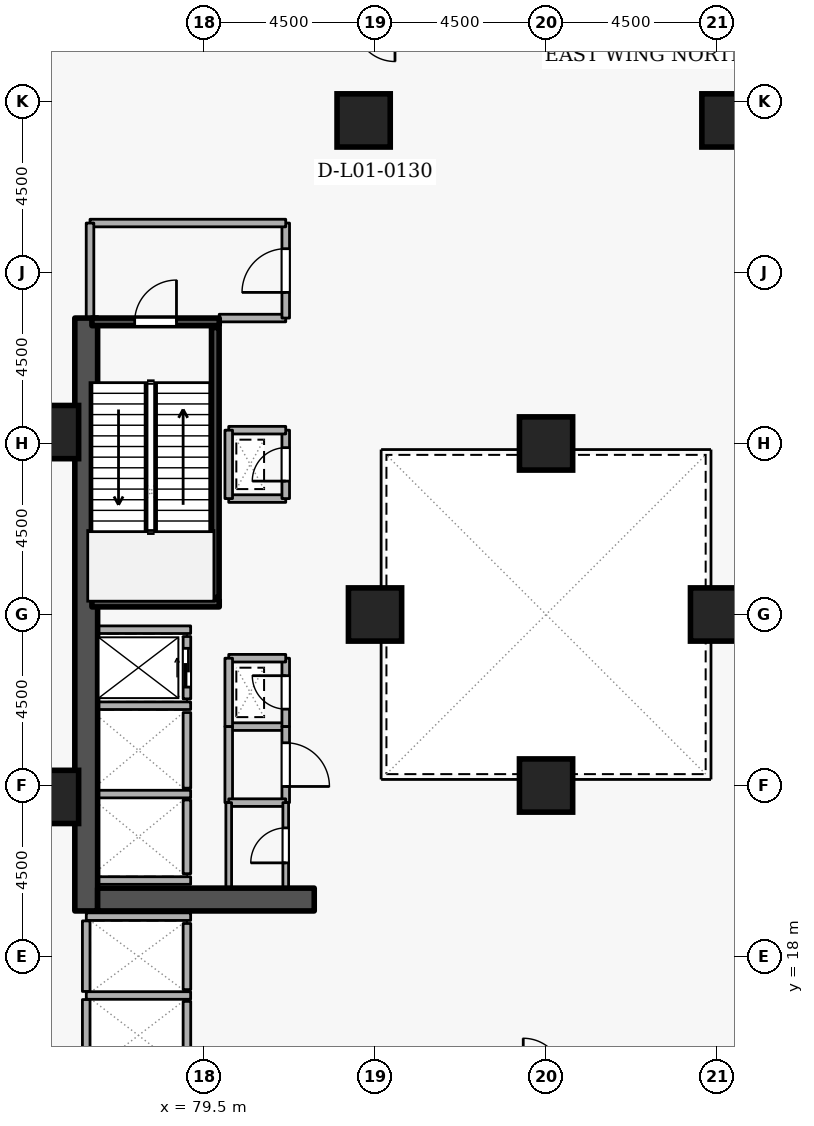
"""IFC4 building model, lengths in metres.
Left out: names, types, materials, properties, quantities, classifications, styles, units other than length and angle.
Written with IfcOpenShell. Run it as: python <this file> out.ifc"""

import sys

from ifc_helpers import new_model, si_unit, direction, frame, frame_2d, origin, origin_2d, place, context, subcontext, project, spatial, rectangle, extrude, element, fill, save


model = new_model("IFC4")
c1 = context("Model", 3, precision=1e-05, world=origin(), true_north=direction((0.0, 1.0)))
c2 = subcontext(c1, "Body", "Model", "MODEL_VIEW")
j1 = project(units=[si_unit("LENGTHUNIT", "METRE"), si_unit("PLANEANGLEUNIT", "RADIAN")], contexts=[c1])
p1 = place(None, origin())
s1 = spatial("IfcSite", under=j1, at=p1, CompositionType="ELEMENT")
p2 = place(p1, origin())
s2 = spatial("IfcBuilding", under=s1, at=p2, CompositionType="ELEMENT")
p3 = place(p2, frame((0.0, 0.0, 4.8)))
s3 = spatial("IfcBuildingStorey", under=s2, at=p3, CompositionType="ELEMENT", Elevation=4.8)
p4 = place(p3, frame((76.4, 19.2, 0.0), z_axis=(0.0, 0.0, 1.0), x_axis=(0.0, 1.0, 0.0)))
e1 = element("IfcWall", 1, at=p4, inside=s3, PredefinedType="SHEAR", context=c2, shape_type="SweptSolid", body=[
    extrude(rectangle(XDim=15.6, YDim=0.6, at=frame_2d((7.8, 0.0))), origin(), (0.0, 0.0, 1.0), 4.8),
])
p5 = place(p3, frame((76.7, 19.5, 0.0), z_axis=(0.0, 0.0, 1.0), x_axis=(1.0, 0.0, 0.0)))
e2 = element("IfcWall", 2, at=p5, inside=s3, PredefinedType="SHEAR", context=c2, shape_type="SweptSolid", body=[
    extrude(rectangle(XDim=5.7, YDim=0.6, at=frame_2d((2.85, 0.0))), origin(), (0.0, 0.0, 1.0), 4.8),
])
for number, where, z_axis, x_axis in (
    (3, (93.3, 40.0, 0.0), (0.0, 0.0, 1.0), (1.0, 0.0, 0.0)),
    (4, (83.7, 40.0, 0.0), (0.0, 0.0, 1.0), (1.0, 0.0, 0.0)),
    (5, (75.5, 22.2, 0.0), (0.0, 0.0, 1.0), (1.0, 0.0, 0.0)),
    (6, (75.5, 31.8, 0.0), (0.0, 0.0, 1.0), (1.0, 0.0, 0.0)),
    (7, (93.0, 27.0, 0.0), (0.0, 0.0, 1.0), (1.0, 0.0, 0.0)),
    (8, (84.0, 27.0, 0.0), (0.0, 0.0, 1.0), (1.0, 0.0, 0.0)),
    (9, (88.5, 22.5, 0.0), (0.0, 0.0, 1.0), (1.0, 0.0, 0.0)),
    (10, (88.5, 31.5, 0.0), (0.0, 0.0, 1.0), (1.0, 0.0, 0.0)),
):
    element("IfcColumn", number, at=place(p3, frame(where, z_axis=z_axis, x_axis=x_axis)), inside=s3, PredefinedType="COLUMN", context=c2, shape_type="SweptSolid", body=[
        extrude(rectangle(XDim=1.4, YDim=1.4, at=origin_2d()), origin(), (0.0, 0.0, 1.0), 4.8),
    ])
p6 = place(p3, frame((79.05, 24.78, 0.0), z_axis=(0.0, 0.0, 1.0), x_axis=(0.0, 1.0, 0.0)))
e11 = element("IfcWall", 11, at=p6, inside=s3, PredefinedType="STANDARD", context=c2, shape_type="SweptSolid", body=[
    extrude(rectangle(XDim=1.64, YDim=0.2, at=frame_2d((0.82, 0.0))), origin(), (0.0, 0.0, 1.0), 4.46),
])
p7 = place(p6, frame((0.31, 0.0, 0.0)))
e12 = element("IfcOpeningElement", 12, at=p7, cuts=e11, PredefinedType="OPENING", context=c2, shape_type="SweptSolid", body=[
    extrude(rectangle(XDim=1.02, YDim=2.06, at=frame_2d((0.51, 1.03))), frame((0.0, 0.11, 0.0), z_axis=(0.0, -1.0, 0.0), x_axis=(1.0, 0.0, 0.0)), (0.0, 0.0, 1.0), 0.22),
])
p8 = place(p3, frame((79.05, 22.43, 0.0), z_axis=(0.0, 0.0, 1.0), x_axis=(0.0, 1.0, 0.0)))
e13 = element("IfcWall", 13, at=p8, inside=s3, PredefinedType="STANDARD", context=c2, shape_type="SweptSolid", body=[
    extrude(rectangle(XDim=1.99, YDim=0.2, at=frame_2d((0.995, 0.0))), origin(), (0.0, 0.0, 1.0), 4.46),
])
p9 = place(p3, frame((79.05, 20.18, 0.0), z_axis=(0.0, 0.0, 1.0), x_axis=(0.0, 1.0, 0.0)))
e14 = element("IfcWall", 14, at=p9, inside=s3, PredefinedType="STANDARD", context=c2, shape_type="SweptSolid", body=[
    extrude(rectangle(XDim=1.94, YDim=0.2, at=frame_2d((0.97, 0.0))), origin(), (0.0, 0.0, 1.0), 4.46),
])
p10 = place(p3, frame((79.05, 17.13, 0.0), z_axis=(0.0, 0.0, 1.0), x_axis=(0.0, 1.0, 0.0)))
e15 = element("IfcWall", 15, at=p10, inside=s3, PredefinedType="STANDARD", context=c2, shape_type="SweptSolid", body=[
    extrude(rectangle(XDim=1.74, YDim=0.2, at=frame_2d((0.87, 0.0))), origin(), (0.0, 0.0, 1.0), 4.46),
])
p11 = place(p3, frame((79.05, 15.03, 0.0), z_axis=(0.0, 0.0, 1.0), x_axis=(0.0, 1.0, 0.0)))
e16 = element("IfcWall", 16, at=p11, inside=s3, PredefinedType="STANDARD", context=c2, shape_type="SweptSolid", body=[
    extrude(rectangle(XDim=1.79, YDim=0.2, at=frame_2d((0.895, 0.0))), origin(), (0.0, 0.0, 1.0), 4.46),
])
for number, where, z_axis, x_axis in (
    (17, (76.712, 26.6, 0.0), (0.0, 0.0, 1.0), (1.0, 0.0, 0.0)),
    (18, (76.712, 24.6, 0.0), (0.0, 0.0, 1.0), (1.0, 0.0, 0.0)),
    (19, (76.712, 22.275, 0.0), (0.0, 0.0, 1.0), (1.0, 0.0, 0.0)),
    (20, (76.712, 20.0, 0.0), (0.0, 0.0, 1.0), (1.0, 0.0, 0.0)),
):
    element("IfcWall", number, at=place(p3, frame(where, z_axis=z_axis, x_axis=x_axis)), inside=s3, PredefinedType="STANDARD", context=c2, shape_type="SweptSolid", body=[
        extrude(rectangle(XDim=2.436, YDim=0.2, at=frame_2d((1.218, 0.0))), origin(), (0.0, 0.0, 1.0), 4.46),
    ])
p12 = place(p3, frame((76.402, 19.05, 0.0), z_axis=(0.0, 0.0, 1.0), x_axis=(1.0, 0.0, 0.0)))
e21 = element("IfcWall", 21, at=p12, inside=s3, PredefinedType="STANDARD", context=c2, shape_type="SweptSolid", body=[
    extrude(rectangle(XDim=2.746, YDim=0.2, at=frame_2d((1.373, 0.0))), origin(), (0.0, 0.0, 1.0), 3.665),
])
p13 = place(p3, frame((76.402, 16.975, 0.0), z_axis=(0.0, 0.0, 1.0), x_axis=(1.0, 0.0, 0.0)))
e22 = element("IfcWall", 22, at=p13, inside=s3, PredefinedType="STANDARD", context=c2, shape_type="SweptSolid", body=[
    extrude(rectangle(XDim=2.746, YDim=0.2, at=frame_2d((1.373, 0.0))), origin(), (0.0, 0.0, 1.0), 4.46),
])
p14 = place(p3, frame((76.4, 14.852, 0.0), z_axis=(0.0, 0.0, 1.0), x_axis=(0.0, 1.0, 0.0)))
e23 = element("IfcWall", 23, at=p14, inside=s3, PredefinedType="STANDARD", context=c2, shape_type="SweptSolid", body=[
    extrude(rectangle(XDim=2.016, YDim=0.2, at=frame_2d((1.008, 0.0))), origin(), (0.0, 0.0, 1.0), 4.46),
])
p15 = place(p3, frame((76.4, 17.082, 0.0), z_axis=(0.0, 0.0, 1.0), x_axis=(0.0, 1.0, 0.0)))
e24 = element("IfcWall", 24, at=p15, inside=s3, PredefinedType="STANDARD", context=c2, shape_type="SweptSolid", body=[
    extrude(rectangle(XDim=1.856, YDim=0.2, at=frame_2d((0.928, 0.0))), origin(), (0.0, 0.0, 1.0), 4.46),
])
p16 = place(p3, frame((76.55, 34.7, 0.0), z_axis=(0.0, 0.0, 1.0), x_axis=(1.0, 0.0, 0.0)))
e25 = element("IfcWall", 25, at=p16, inside=s3, PredefinedType="SHEAR", context=c2, shape_type="SweptSolid", body=[
    extrude(rectangle(XDim=3.35, YDim=0.2, at=frame_2d((1.675, 0.0))), origin(), (0.0, 0.0, 1.0), 4.8),
])
p17 = place(p16, frame((1.125, 0.0, 0.0)))
e26 = element("IfcOpeningElement", 26, at=p17, cuts=e25, PredefinedType="OPENING", context=c2, shape_type="SweptSolid", body=[
    extrude(rectangle(XDim=1.1, YDim=2.1, at=frame_2d((0.55, 1.05))), frame((0.0, 0.11, 0.0), z_axis=(0.0, -1.0, 0.0), x_axis=(1.0, 0.0, 0.0)), (0.0, 0.0, 1.0), 0.22),
])
p18 = place(p3, frame((79.9, 27.3, 0.0), z_axis=(0.0, 0.0, 1.0), x_axis=(-1.0, 0.0, 0.0)))
e27 = element("IfcWall", 27, at=p18, inside=s3, PredefinedType="SHEAR", context=c2, shape_type="SweptSolid", body=[
    extrude(rectangle(XDim=3.35, YDim=0.2, at=frame_2d((1.675, 0.0))), origin(), (0.0, 0.0, 1.0), 4.8),
])
p19 = place(p3, frame((79.797, 27.45, 0.0), z_axis=(0.0, 0.0, 1.0), x_axis=(0.0, 1.0, 0.0)))
e28 = element("IfcWall", 28, at=p19, inside=s3, PredefinedType="SHEAR", context=c2, shape_type="SweptSolid", body=[
    extrude(rectangle(XDim=7.1, YDim=0.2, at=frame_2d((3.55, 0.0))), origin(), (0.0, 0.0, 1.0), 4.8),
])
p20 = place(p3, frame((79.9, 34.8, 0.0), z_axis=(0.0, 0.0, 1.0), x_axis=(1.0, 0.0, 0.0)))
e29 = element("IfcWall", 29, at=p20, inside=s3, PredefinedType="STANDARD", context=c2, shape_type="SweptSolid", body=[
    extrude(rectangle(XDim=1.75, YDim=0.2, at=frame_2d((0.875, 0.0))), origin(), (0.0, 0.0, 1.0), 3.665),
])
p21 = place(p3, frame((81.65, 34.8, 0.0), z_axis=(0.0, 0.0, 1.0), x_axis=(0.0, 1.0, 0.0)))
e30 = element("IfcWall", 30, at=p21, inside=s3, PredefinedType="STANDARD", context=c2, shape_type="SweptSolid", body=[
    extrude(rectangle(XDim=2.5, YDim=0.2, at=frame_2d((1.25, 0.0))), origin(), (0.0, 0.0, 1.0), 4.46),
])
p22 = place(p21, frame((0.675, 0.0, 0.0)))
e31 = element("IfcOpeningElement", 31, at=p22, cuts=e30, PredefinedType="OPENING", context=c2, shape_type="SweptSolid", body=[
    extrude(rectangle(XDim=1.15, YDim=2.1, at=frame_2d((0.575, 1.05))), frame((0.0, 0.11, 0.0), z_axis=(0.0, -1.0, 0.0), x_axis=(1.0, 0.0, 0.0)), (0.0, 0.0, 1.0), 0.22),
])
p23 = place(p3, frame((81.65, 37.3, 0.0), z_axis=(0.0, 0.0, 1.0), x_axis=(-1.0, 0.0, 0.0)))
e32 = element("IfcWall", 32, at=p23, inside=s3, PredefinedType="STANDARD", context=c2, shape_type="SweptSolid", body=[
    extrude(rectangle(XDim=5.15, YDim=0.2, at=frame_2d((2.575, 0.0))), origin(), (0.0, 0.0, 1.0), 4.46),
])
p24 = place(p3, frame((76.5, 37.3, 0.0), z_axis=(0.0, 0.0, 1.0), x_axis=(0.0, -1.0, 0.0)))
e33 = element("IfcWall", 33, at=p24, inside=s3, PredefinedType="STANDARD", context=c2, shape_type="SweptSolid", body=[
    extrude(rectangle(XDim=2.5, YDim=0.2, at=frame_2d((1.25, 0.0))), origin(), (0.0, 0.0, 1.0), 4.46),
])
p25 = place(p3, frame((80.15, 24.05, 0.0), z_axis=(0.0, 0.0, 1.0), x_axis=(1.0, 0.0, 0.0)))
e34 = element("IfcWall", 34, at=p25, inside=s3, PredefinedType="STANDARD", context=c2, shape_type="SweptSolid", body=[
    extrude(rectangle(XDim=1.5, YDim=0.2, at=frame_2d((0.75, 0.0))), origin(), (0.0, 0.0, 1.0), 4.46),
])
p26 = place(p3, frame((81.65, 24.05, 0.0), z_axis=(0.0, 0.0, 1.0), x_axis=(0.0, 1.0, 0.0)))
e35 = element("IfcWall", 35, at=p26, inside=s3, PredefinedType="STANDARD", context=c2, shape_type="SweptSolid", body=[
    extrude(rectangle(XDim=1.8, YDim=0.2, at=frame_2d((0.9, 0.0))), origin(), (0.0, 0.0, 1.0), 4.46),
])
p27 = place(p26, frame((0.46, 0.0, 0.0)))
e36 = element("IfcOpeningElement", 36, at=p27, cuts=e35, PredefinedType="OPENING", context=c2, shape_type="SweptSolid", body=[
    extrude(rectangle(XDim=0.88, YDim=2.04, at=frame_2d((0.44, 1.02))), frame((0.0, 0.11, 0.0), z_axis=(0.0, -1.0, 0.0), x_axis=(1.0, 0.0, 0.0)), (0.0, 0.0, 1.0), 0.22),
])
p28 = place(p3, frame((81.65, 25.85, 0.0), z_axis=(0.0, 0.0, 1.0), x_axis=(-1.0, 0.0, 0.0)))
e37 = element("IfcWall", 37, at=p28, inside=s3, PredefinedType="STANDARD", context=c2, shape_type="SweptSolid", body=[
    extrude(rectangle(XDim=1.5, YDim=0.2, at=frame_2d((0.75, 0.0))), origin(), (0.0, 0.0, 1.0), 4.46),
])
p29 = place(p3, frame((80.15, 25.85, 0.0), z_axis=(0.0, 0.0, 1.0), x_axis=(0.0, -1.0, 0.0)))
e38 = element("IfcWall", 38, at=p29, inside=s3, PredefinedType="STANDARD", context=c2, shape_type="SweptSolid", body=[
    extrude(rectangle(XDim=1.8, YDim=0.2, at=frame_2d((0.9, 0.0))), origin(), (0.0, 0.0, 1.0), 4.46),
])
p30 = place(p3, frame((80.15, 30.05, 0.0), z_axis=(0.0, 0.0, 1.0), x_axis=(1.0, 0.0, 0.0)))
e39 = element("IfcWall", 39, at=p30, inside=s3, PredefinedType="STANDARD", context=c2, shape_type="SweptSolid", body=[
    extrude(rectangle(XDim=1.5, YDim=0.2, at=frame_2d((0.75, 0.0))), origin(), (0.0, 0.0, 1.0), 4.46),
])
p31 = place(p3, frame((81.65, 30.05, 0.0), z_axis=(0.0, 0.0, 1.0), x_axis=(0.0, 1.0, 0.0)))
e40 = element("IfcWall", 40, at=p31, inside=s3, PredefinedType="STANDARD", context=c2, shape_type="SweptSolid", body=[
    extrude(rectangle(XDim=1.8, YDim=0.2, at=frame_2d((0.9, 0.0))), origin(), (0.0, 0.0, 1.0), 4.46),
])
p32 = place(p31, frame((0.46, 0.0, 0.0)))
e41 = element("IfcOpeningElement", 41, at=p32, cuts=e40, PredefinedType="OPENING", context=c2, shape_type="SweptSolid", body=[
    extrude(rectangle(XDim=0.88, YDim=2.04, at=frame_2d((0.44, 1.02))), frame((0.0, 0.11, 0.0), z_axis=(0.0, -1.0, 0.0), x_axis=(1.0, 0.0, 0.0)), (0.0, 0.0, 1.0), 0.22),
])
p33 = place(p3, frame((81.65, 31.85, 0.0), z_axis=(0.0, 0.0, 1.0), x_axis=(-1.0, 0.0, 0.0)))
e42 = element("IfcWall", 42, at=p33, inside=s3, PredefinedType="STANDARD", context=c2, shape_type="SweptSolid", body=[
    extrude(rectangle(XDim=1.5, YDim=0.2, at=frame_2d((0.75, 0.0))), origin(), (0.0, 0.0, 1.0), 4.46),
])
p34 = place(p3, frame((80.15, 31.85, 0.0), z_axis=(0.0, 0.0, 1.0), x_axis=(0.0, -1.0, 0.0)))
e43 = element("IfcWall", 43, at=p34, inside=s3, PredefinedType="STANDARD", context=c2, shape_type="SweptSolid", body=[
    extrude(rectangle(XDim=1.8, YDim=0.2, at=frame_2d((0.9, 0.0))), origin(), (0.0, 0.0, 1.0), 4.46),
])
p35 = place(p3, frame((80.15, 22.05, 0.0), z_axis=(0.0, 0.0, 1.0), x_axis=(0.0, 1.0, 0.0)))
e44 = element("IfcWall", 44, at=p35, inside=s3, PredefinedType="STANDARD", context=c2, shape_type="SweptSolid", body=[
    extrude(rectangle(XDim=2.0, YDim=0.2, at=frame_2d((1.0, 0.0))), origin(), (0.0, 0.0, 1.0), 4.46),
])
p36 = place(p3, frame((81.65, 24.05, 0.0), z_axis=(0.0, 0.0, 1.0), x_axis=(0.0, -1.0, 0.0)))
e45 = element("IfcWall", 45, at=p36, inside=s3, PredefinedType="STANDARD", context=c2, shape_type="SweptSolid", body=[
    extrude(rectangle(XDim=2.0, YDim=0.2, at=frame_2d((1.0, 0.0))), origin(), (0.0, 0.0, 1.0), 4.46),
])
p37 = place(p36, frame((0.425, 0.0, 0.0)))
e46 = element("IfcOpeningElement", 46, at=p37, cuts=e45, PredefinedType="OPENING", context=c2, shape_type="SweptSolid", body=[
    extrude(rectangle(XDim=1.15, YDim=2.1, at=frame_2d((0.575, 1.05))), frame((0.0, 0.11, 0.0), z_axis=(0.0, -1.0, 0.0), x_axis=(1.0, 0.0, 0.0)), (0.0, 0.0, 1.0), 0.22),
])
p38 = place(p3, frame((81.65, 22.05, 0.0), z_axis=(0.0, 0.0, 1.0), x_axis=(-1.0, 0.0, 0.0)))
e47 = element("IfcWall", 47, at=p38, inside=s3, PredefinedType="STANDARD", context=c2, shape_type="SweptSolid", body=[
    extrude(rectangle(XDim=1.5, YDim=0.2, at=frame_2d((0.75, 0.0))), origin(), (0.0, 0.0, 1.0), 4.46),
])
p39 = place(p3, frame((81.65, 19.8, 0.0), z_axis=(0.0, 0.0, 1.0), x_axis=(0.0, 1.0, 0.0)))
e48 = element("IfcWall", 48, at=p39, inside=s3, PredefinedType="PARTITIONING", context=c2, shape_type="SweptSolid", body=[
    extrude(rectangle(XDim=2.25, YDim=0.15, at=frame_2d((1.125, 0.0))), origin(), (0.0, 0.0, 1.0), 4.46),
])
p40 = place(p39, frame((0.665, 0.0, 0.0)))
e49 = element("IfcOpeningElement", 49, at=p40, cuts=e48, PredefinedType="OPENING", context=c2, shape_type="SweptSolid", body=[
    extrude(rectangle(XDim=0.92, YDim=2.08, at=frame_2d((0.46, 1.04))), frame((0.0, 0.085, 0.0), z_axis=(0.0, -1.0, 0.0), x_axis=(1.0, 0.0, 0.0)), (0.0, 0.0, 1.0), 0.17),
])
p41 = place(p3, frame((80.15, 22.05, 0.0), z_axis=(0.0, 0.0, 1.0), x_axis=(0.0, -1.0, 0.0)))
e50 = element("IfcWall", 50, at=p41, inside=s3, PredefinedType="PARTITIONING", context=c2, shape_type="SweptSolid", body=[
    extrude(rectangle(XDim=2.25, YDim=0.15, at=frame_2d((1.125, 0.0))), origin(), (0.0, 0.0, 1.0), 4.46),
])
p42 = place(p7, origin())
e51 = element("IfcDoor", 51, at=p42, inside=s3, OperationType="SLIDING_TO_LEFT", PredefinedType="DOOR", context=c2, shape_type="SweptSolid", body=[
    extrude(rectangle(XDim=1.02, YDim=2.06, at=frame_2d((0.51, 1.03))), frame((0.0, 0.025, 0.0), z_axis=(0.0, -1.0, 0.0), x_axis=(1.0, 0.0, 0.0)), (0.0, 0.0, 1.0), 0.05),
])
fill(e12, e51)
p43 = place(p17, origin())
e52 = element("IfcDoor", 52, at=p43, inside=s3, OperationType="SINGLE_SWING_RIGHT", PredefinedType="DOOR", context=c2, shape_type="SweptSolid", body=[
    extrude(rectangle(XDim=1.1, YDim=2.1, at=frame_2d((0.55, 1.05))), frame((0.0, 0.025, 0.0), z_axis=(0.0, -1.0, 0.0), x_axis=(1.0, 0.0, 0.0)), (0.0, 0.0, 1.0), 0.05),
])
fill(e26, e52)
p44 = place(p22, origin())
e53 = element("IfcDoor", 53, at=p44, inside=s3, OperationType="SINGLE_SWING_LEFT", PredefinedType="DOOR", context=c2, shape_type="SweptSolid", body=[
    extrude(rectangle(XDim=1.15, YDim=2.1, at=frame_2d((0.575, 1.05))), frame((0.0, 0.025, 0.0), z_axis=(0.0, -1.0, 0.0), x_axis=(1.0, 0.0, 0.0)), (0.0, 0.0, 1.0), 0.05),
])
fill(e31, e53)
p45 = place(p27, origin())
e54 = element("IfcDoor", 54, at=p45, inside=s3, OperationType="SINGLE_SWING_RIGHT", PredefinedType="DOOR", context=c2, shape_type="SweptSolid", body=[
    extrude(rectangle(XDim=0.88, YDim=2.04, at=frame_2d((0.44, 1.02))), frame((0.0, 0.025, 0.0), z_axis=(0.0, -1.0, 0.0), x_axis=(1.0, 0.0, 0.0)), (0.0, 0.0, 1.0), 0.05),
])
fill(e36, e54)
p46 = place(p32, origin())
e55 = element("IfcDoor", 55, at=p46, inside=s3, OperationType="SINGLE_SWING_LEFT", PredefinedType="DOOR", context=c2, shape_type="SweptSolid", body=[
    extrude(rectangle(XDim=0.88, YDim=2.04, at=frame_2d((0.44, 1.02))), frame((0.0, 0.025, 0.0), z_axis=(0.0, -1.0, 0.0), x_axis=(1.0, 0.0, 0.0)), (0.0, 0.0, 1.0), 0.05),
])
fill(e41, e55)
p47 = place(p40, origin())
e56 = element("IfcDoor", 56, at=p47, inside=s3, OperationType="SINGLE_SWING_LEFT", PredefinedType="DOOR", context=c2, shape_type="SweptSolid", body=[
    extrude(rectangle(XDim=0.92, YDim=2.08, at=frame_2d((0.46, 1.04))), frame((0.0, 0.025, 0.0), z_axis=(0.0, -1.0, 0.0), x_axis=(1.0, 0.0, 0.0)), (0.0, 0.0, 1.0), 0.05),
])
fill(e49, e56)
p48 = place(p37, origin())
e57 = element("IfcDoor", 57, at=p48, inside=s3, OperationType="SINGLE_SWING_RIGHT", PredefinedType="DOOR", context=c2, shape_type="SweptSolid", body=[
    extrude(rectangle(XDim=1.15, YDim=2.1, at=frame_2d((0.575, 1.05))), frame((0.0, 0.025, 0.0), z_axis=(0.0, -1.0, 0.0), x_axis=(1.0, 0.0, 0.0)), (0.0, 0.0, 1.0), 0.05),
])
fill(e46, e57)
save(model, sys.argv[1])
